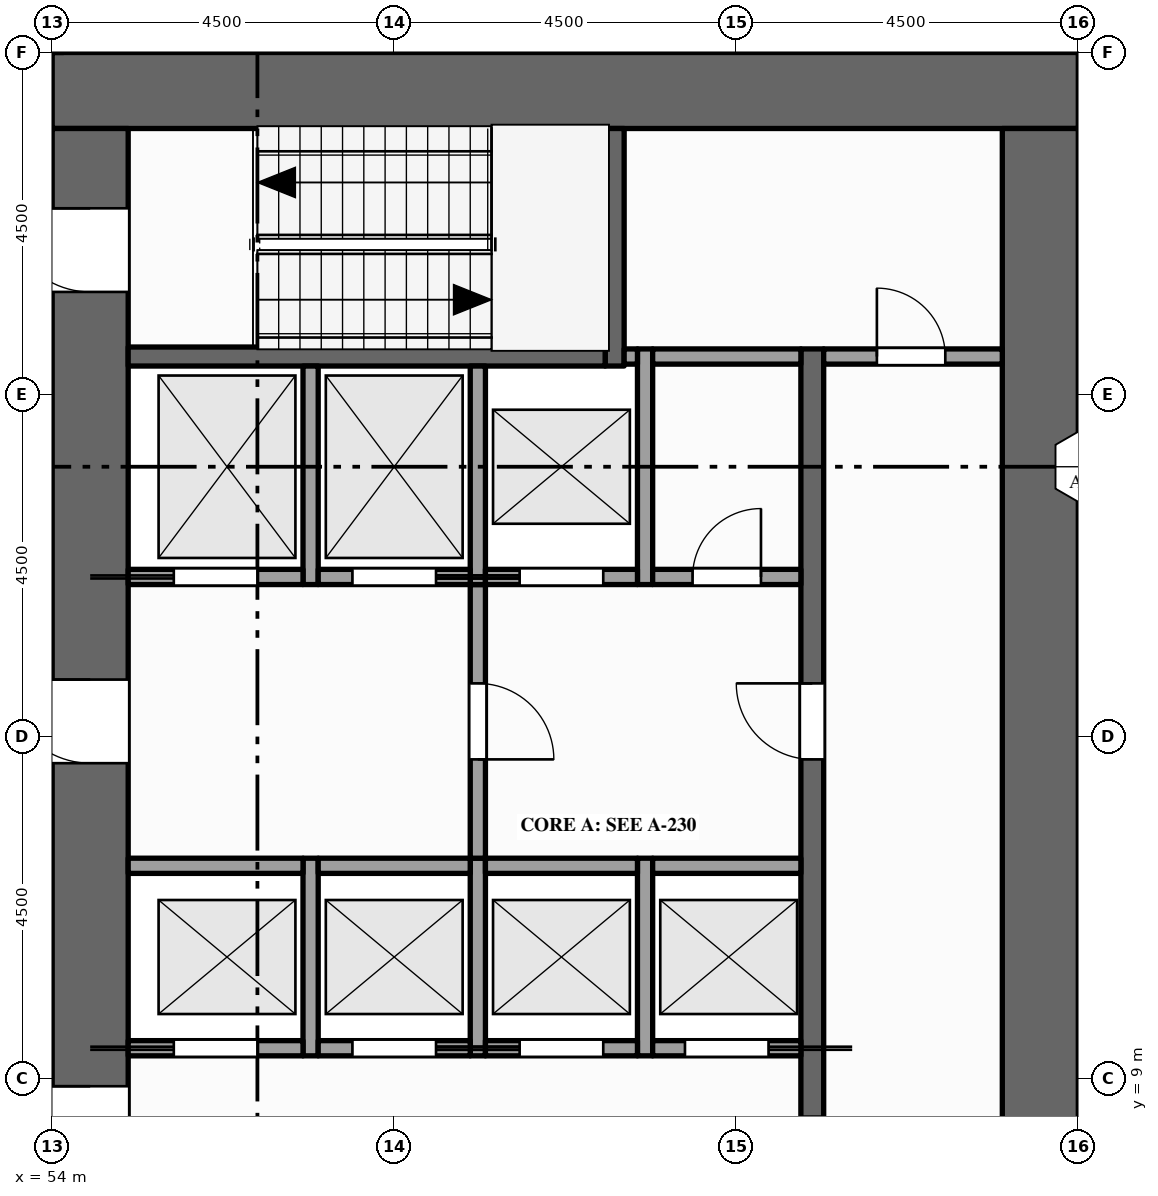
"""IFC4 building model, lengths in metres.
Left out: names, types, materials, properties, quantities, classifications, styles, units other than length and angle.
Written with IfcOpenShell. Run it as: python <this file> out.ifc"""

import sys

from ifc_helpers import new_model, si_unit, direction, frame, frame_2d, origin, place, context, subcontext, project, spatial, rectangle, extrude, element, fill, save


model = new_model("IFC4")
c1 = context("Model", 3, precision=1e-05, world=origin(), true_north=direction((0.0, 1.0)))
c2 = subcontext(c1, "Body", "Model", "MODEL_VIEW")
j1 = project(units=[si_unit("LENGTHUNIT", "METRE"), si_unit("PLANEANGLEUNIT", "RADIAN")], contexts=[c1])
p1 = place(None, origin())
s1 = spatial("IfcSite", under=j1, at=p1, CompositionType="ELEMENT")
p2 = place(p1, origin())
s2 = spatial("IfcBuilding", under=s1, at=p2, CompositionType="ELEMENT")
p3 = place(p2, frame((0.0, 0.0, 159.0)))
s3 = spatial("IfcBuildingStorey", under=s2, at=p3, CompositionType="ELEMENT", Elevation=159.0)
p4 = place(p3, frame((54.0, 22.0, -0.15), z_axis=(0.0, 0.0, 1.0), x_axis=(1.0, 0.0, 0.0)))
e1 = element("IfcWall", 1, at=p4, inside=s3, PredefinedType="SHEAR", context=c2, shape_type="SweptSolid", body=[
    extrude(rectangle(XDim=13.5, YDim=1.0, at=frame_2d((6.75, 0.0))), origin(), (0.0, 0.0, 1.0), 4.0),
])
p5 = place(p3, frame((54.5, 1.0, -0.15), z_axis=(0.0, 0.0, 1.0), x_axis=(0.0, 1.0, 0.0)))
e2 = element("IfcWall", 2, at=p5, inside=s3, PredefinedType="SHEAR", context=c2, shape_type="SweptSolid", body=[
    extrude(rectangle(XDim=20.5, YDim=1.0, at=frame_2d((10.25, 0.0))), origin(), (0.0, 0.0, 1.0), 4.0),
])
p6 = place(p5, frame((6.1, 0.0, 0.15)))
e3 = element("IfcOpeningElement", 3, at=p6, cuts=e2, PredefinedType="OPENING", context=c2, shape_type="SweptSolid", body=[
    extrude(rectangle(XDim=1.8, YDim=2.1, at=frame_2d((0.9, 1.05))), frame((0.0, 0.51, 0.0), z_axis=(0.0, -1.0, 0.0), x_axis=(1.0, 0.0, 0.0)), (0.0, 0.0, 1.0), 1.02),
])
p7 = place(p5, frame((12.15, 0.0, 0.15)))
e4 = element("IfcOpeningElement", 4, at=p7, cuts=e2, PredefinedType="OPENING", context=c2, shape_type="SweptSolid", body=[
    extrude(rectangle(XDim=1.1, YDim=2.1, at=frame_2d((0.55, 1.05))), frame((0.0, 0.51, 0.0), z_axis=(0.0, -1.0, 0.0), x_axis=(1.0, 0.0, 0.0)), (0.0, 0.0, 1.0), 1.02),
])
p8 = place(p5, frame((1.15, 0.0, 0.15)))
e5 = element("IfcOpeningElement", 5, at=p8, cuts=e2, PredefinedType="OPENING", context=c2, shape_type="SweptSolid", body=[
    extrude(rectangle(XDim=1.1, YDim=2.1, at=frame_2d((0.55, 1.05))), frame((0.0, 0.51, 0.0), z_axis=(0.0, -1.0, 0.0), x_axis=(1.0, 0.0, 0.0)), (0.0, 0.0, 1.0), 1.02),
])
p9 = place(p5, frame((18.35, 0.0, 0.15)))
e6 = element("IfcOpeningElement", 6, at=p9, cuts=e2, PredefinedType="OPENING", context=c2, shape_type="SweptSolid", body=[
    extrude(rectangle(XDim=1.1, YDim=2.1, at=frame_2d((0.55, 1.05))), frame((0.0, 0.51, 0.0), z_axis=(0.0, -1.0, 0.0), x_axis=(1.0, 0.0, 0.0)), (0.0, 0.0, 1.0), 1.02),
])
p10 = place(p3, frame((67.0, 1.0, -0.15), z_axis=(0.0, 0.0, 1.0), x_axis=(0.0, 1.0, 0.0)))
e7 = element("IfcWall", 7, at=p10, inside=s3, PredefinedType="SHEAR", context=c2, shape_type="SweptSolid", body=[
    extrude(rectangle(XDim=20.5, YDim=1.0, at=frame_2d((10.25, 0.0))), origin(), (0.0, 0.0, 1.0), 4.0),
])
p11 = place(p3, frame((54.0, 22.5, 0.0), z_axis=(0.0, 0.0, 1.0), x_axis=(0.0, 1.0, 0.0)))
e8 = element("IfcWall", 8, at=p11, inside=s3, PredefinedType="STANDARD", context=c2, shape_type="SweptSolid", body=[
    extrude(rectangle(XDim=1.05, YDim=0.3, at=frame_2d((0.525, 0.0))), origin(), (0.0, 0.0, 1.0), 3.149),
])
p12 = place(p3, frame((57.4, 9.3, 0.0), z_axis=(0.0, 0.0, 1.0), x_axis=(0.0, 1.0, 0.0)))
e9 = element("IfcWall", 9, at=p12, inside=s3, PredefinedType="SOLIDWALL", context=c2, shape_type="SweptSolid", body=[
    extrude(rectangle(XDim=2.6, YDim=0.2, at=frame_2d((1.3, 0.0))), origin(), (0.0, 0.0, 1.0), 3.85),
])
p13 = place(p3, frame((57.4, 15.5, 0.0), z_axis=(0.0, 0.0, 1.0), x_axis=(0.0, 1.0, 0.0)))
e10 = element("IfcWall", 10, at=p13, inside=s3, PredefinedType="SOLIDWALL", context=c2, shape_type="SweptSolid", body=[
    extrude(rectangle(XDim=2.875, YDim=0.2, at=frame_2d((1.438, 0.0))), origin(), (0.0, 0.0, 1.0), 3.85),
])
p14 = place(p3, frame((59.6, 9.3, 0.0), z_axis=(0.0, 0.0, 1.0), x_axis=(0.0, 1.0, 0.0)))
e11 = element("IfcWall", 11, at=p14, inside=s3, PredefinedType="SOLIDWALL", context=c2, shape_type="SweptSolid", body=[
    extrude(rectangle(XDim=2.6, YDim=0.2, at=frame_2d((1.3, 0.0))), origin(), (0.0, 0.0, 1.0), 3.85),
])
p15 = place(p3, frame((59.6, 11.9, 0.0), z_axis=(0.0, 0.0, 1.0), x_axis=(0.0, 1.0, 0.0)))
e12 = element("IfcWall", 12, at=p15, inside=s3, PredefinedType="PARTITIONING", context=c2, shape_type="SweptSolid", body=[
    extrude(rectangle(XDim=3.6, YDim=0.2, at=frame_2d((1.8, 0.0))), origin(), (0.0, 0.0, 1.0), 3.85),
])
p16 = place(p15, frame((1.3, 0.0, 0.0)))
e13 = element("IfcOpeningElement", 13, at=p16, cuts=e12, PredefinedType="OPENING", context=c2, shape_type="SweptSolid", body=[
    extrude(rectangle(XDim=1.0, YDim=2.1, at=frame_2d((0.5, 1.05))), frame((0.0, 0.11, 0.0), z_axis=(0.0, -1.0, 0.0), x_axis=(1.0, 0.0, 0.0)), (0.0, 0.0, 1.0), 0.22),
])
p17 = place(p3, frame((59.6, 15.5, 0.0), z_axis=(0.0, 0.0, 1.0), x_axis=(0.0, 1.0, 0.0)))
e14 = element("IfcWall", 14, at=p17, inside=s3, PredefinedType="SOLIDWALL", context=c2, shape_type="SweptSolid", body=[
    extrude(rectangle(XDim=2.875, YDim=0.2, at=frame_2d((1.438, 0.0))), origin(), (0.0, 0.0, 1.0), 3.85),
])
p18 = place(p3, frame((61.4, 18.375, 0.0), z_axis=(0.0, 0.0, 1.0), x_axis=(0.0, 1.0, 0.0)))
e15 = element("IfcWall", 15, at=p18, inside=s3, PredefinedType="SHEAR", context=c2, shape_type="SweptSolid", body=[
    extrude(rectangle(XDim=3.125, YDim=0.25, at=frame_2d((1.562, 0.0))), origin(), (0.0, 0.0, 1.0), 3.85),
])
p19 = place(p3, frame((61.8, 9.3, 0.0), z_axis=(0.0, 0.0, 1.0), x_axis=(0.0, 1.0, 0.0)))
e16 = element("IfcWall", 16, at=p19, inside=s3, PredefinedType="SOLIDWALL", context=c2, shape_type="SweptSolid", body=[
    extrude(rectangle(XDim=2.6, YDim=0.2, at=frame_2d((1.3, 0.0))), origin(), (0.0, 0.0, 1.0), 3.85),
])
p20 = place(p3, frame((61.8, 15.5, 0.0), z_axis=(0.0, 0.0, 1.0), x_axis=(0.0, 1.0, 0.0)))
e17 = element("IfcWall", 17, at=p20, inside=s3, PredefinedType="SOLIDWALL", context=c2, shape_type="SweptSolid", body=[
    extrude(rectangle(XDim=3.1, YDim=0.2, at=frame_2d((1.55, 0.0))), origin(), (0.0, 0.0, 1.0), 3.85),
])
p21 = place(p3, frame((64.0, 4.1, 0.0), z_axis=(0.0, 0.0, 1.0), x_axis=(0.0, 1.0, 0.0)))
e18 = element("IfcWall", 18, at=p21, inside=s3, PredefinedType="SHEAR", context=c2, shape_type="SweptSolid", body=[
    extrude(rectangle(XDim=14.5, YDim=0.3, at=frame_2d((7.25, 0.0))), origin(), (0.0, 0.0, 1.0), 3.85),
])
p22 = place(p21, frame((3.4, 0.0, 0.0)))
e19 = element("IfcOpeningElement", 19, at=p22, cuts=e18, PredefinedType="OPENING", context=c2, shape_type="SweptSolid", body=[
    extrude(rectangle(XDim=1.0, YDim=2.1, at=frame_2d((0.5, 1.05))), frame((0.0, 0.16, 0.0), z_axis=(0.0, -1.0, 0.0), x_axis=(1.0, 0.0, 0.0)), (0.0, 0.0, 1.0), 0.32),
])
p23 = place(p21, frame((9.1, 0.0, 0.0)))
e20 = element("IfcOpeningElement", 20, at=p23, cuts=e18, PredefinedType="OPENING", context=c2, shape_type="SweptSolid", body=[
    extrude(rectangle(XDim=1.0, YDim=2.1, at=frame_2d((0.5, 1.05))), frame((0.0, 0.16, 0.0), z_axis=(0.0, -1.0, 0.0), x_axis=(1.0, 0.0, 0.0)), (0.0, 0.0, 1.0), 0.32),
])
p24 = place(p3, frame((55.0, 9.4, 0.0), z_axis=(0.0, 0.0, 1.0), x_axis=(1.0, 0.0, 0.0)))
e21 = element("IfcWall", 21, at=p24, inside=s3, PredefinedType="SOLIDWALL", context=c2, shape_type="SweptSolid", body=[
    extrude(rectangle(XDim=2.3, YDim=0.2, at=frame_2d((1.15, 0.0))), origin(), (0.0, 0.0, 1.0), 3.85),
])
p25 = place(p24, frame((0.6, 0.0, 0.012)))
e22 = element("IfcOpeningElement", 22, at=p25, cuts=e21, PredefinedType="OPENING", context=c2, shape_type="SweptSolid", body=[
    extrude(rectangle(XDim=1.1, YDim=2.1, at=frame_2d((0.55, 1.05))), frame((0.0, 0.11, 0.0), z_axis=(0.0, -1.0, 0.0), x_axis=(1.0, 0.0, 0.0)), (0.0, 0.0, 1.0), 0.22),
])
p26 = place(p3, frame((57.5, 9.4, 0.0), z_axis=(0.0, 0.0, 1.0), x_axis=(1.0, 0.0, 0.0)))
e23 = element("IfcWall", 23, at=p26, inside=s3, PredefinedType="SOLIDWALL", context=c2, shape_type="SweptSolid", body=[
    extrude(rectangle(XDim=2.0, YDim=0.2, at=frame_2d((1.0, 0.0))), origin(), (0.0, 0.0, 1.0), 3.85),
])
p27 = place(p26, frame((0.45, 0.0, 0.012)))
e24 = element("IfcOpeningElement", 24, at=p27, cuts=e23, PredefinedType="OPENING", context=c2, shape_type="SweptSolid", body=[
    extrude(rectangle(XDim=1.1, YDim=2.1, at=frame_2d((0.55, 1.05))), frame((0.0, 0.11, 0.0), z_axis=(0.0, -1.0, 0.0), x_axis=(1.0, 0.0, 0.0)), (0.0, 0.0, 1.0), 0.22),
])
p28 = place(p3, frame((59.7, 9.4, 0.0), z_axis=(0.0, 0.0, 1.0), x_axis=(1.0, 0.0, 0.0)))
e25 = element("IfcWall", 25, at=p28, inside=s3, PredefinedType="SOLIDWALL", context=c2, shape_type="SweptSolid", body=[
    extrude(rectangle(XDim=2.0, YDim=0.2, at=frame_2d((1.0, 0.0))), origin(), (0.0, 0.0, 1.0), 3.85),
])
p29 = place(p28, frame((0.45, 0.0, 0.012)))
e26 = element("IfcOpeningElement", 26, at=p29, cuts=e25, PredefinedType="OPENING", context=c2, shape_type="SweptSolid", body=[
    extrude(rectangle(XDim=1.1, YDim=2.1, at=frame_2d((0.55, 1.05))), frame((0.0, 0.11, 0.0), z_axis=(0.0, -1.0, 0.0), x_axis=(1.0, 0.0, 0.0)), (0.0, 0.0, 1.0), 0.22),
])
p30 = place(p3, frame((61.9, 9.4, 0.0), z_axis=(0.0, 0.0, 1.0), x_axis=(1.0, 0.0, 0.0)))
e27 = element("IfcWall", 27, at=p30, inside=s3, PredefinedType="SOLIDWALL", context=c2, shape_type="SweptSolid", body=[
    extrude(rectangle(XDim=1.95, YDim=0.2, at=frame_2d((0.975, 0.0))), origin(), (0.0, 0.0, 1.0), 3.85),
])
p31 = place(p30, frame((0.425, 0.0, 0.012)))
e28 = element("IfcOpeningElement", 28, at=p31, cuts=e27, PredefinedType="OPENING", context=c2, shape_type="SweptSolid", body=[
    extrude(rectangle(XDim=1.1, YDim=2.1, at=frame_2d((0.55, 1.05))), frame((0.0, 0.11, 0.0), z_axis=(0.0, -1.0, 0.0), x_axis=(1.0, 0.0, 0.0)), (0.0, 0.0, 1.0), 0.22),
])
p32 = place(p3, frame((55.0, 11.8, 0.0), z_axis=(0.0, 0.0, 1.0), x_axis=(1.0, 0.0, 0.0)))
e29 = element("IfcWall", 29, at=p32, inside=s3, PredefinedType="SOLIDWALL", context=c2, shape_type="SweptSolid", body=[
    extrude(rectangle(XDim=2.3, YDim=0.2, at=frame_2d((1.15, 0.0))), origin(), (0.0, 0.0, 1.0), 3.85),
])
for number, where, z_axis, x_axis in (
    (30, (57.5, 11.8, 0.0), (0.0, 0.0, 1.0), (1.0, 0.0, 0.0)),
    (31, (59.7, 11.8, 0.0), (0.0, 0.0, 1.0), (1.0, 0.0, 0.0)),
):
    element("IfcWall", number, at=place(p3, frame(where, z_axis=z_axis, x_axis=x_axis)), inside=s3, PredefinedType="SOLIDWALL", context=c2, shape_type="SweptSolid", body=[
        extrude(rectangle(XDim=2.0, YDim=0.2, at=frame_2d((1.0, 0.0))), origin(), (0.0, 0.0, 1.0), 3.85),
    ])
p33 = place(p3, frame((61.9, 11.8, 0.0), z_axis=(0.0, 0.0, 1.0), x_axis=(1.0, 0.0, 0.0)))
e32 = element("IfcWall", 32, at=p33, inside=s3, PredefinedType="SOLIDWALL", context=c2, shape_type="SweptSolid", body=[
    extrude(rectangle(XDim=1.95, YDim=0.2, at=frame_2d((0.975, 0.0))), origin(), (0.0, 0.0, 1.0), 3.85),
])
p34 = place(p3, frame((55.0, 15.6, 0.0), z_axis=(0.0, 0.0, 1.0), x_axis=(1.0, 0.0, 0.0)))
e33 = element("IfcWall", 33, at=p34, inside=s3, PredefinedType="SOLIDWALL", context=c2, shape_type="SweptSolid", body=[
    extrude(rectangle(XDim=2.3, YDim=0.2, at=frame_2d((1.15, 0.0))), origin(), (0.0, 0.0, 1.0), 3.85),
])
p35 = place(p34, frame((0.6, 0.0, 0.012)))
e34 = element("IfcOpeningElement", 34, at=p35, cuts=e33, PredefinedType="OPENING", context=c2, shape_type="SweptSolid", body=[
    extrude(rectangle(XDim=1.1, YDim=2.1, at=frame_2d((0.55, 1.05))), frame((0.0, 0.11, 0.0), z_axis=(0.0, -1.0, 0.0), x_axis=(1.0, 0.0, 0.0)), (0.0, 0.0, 1.0), 0.22),
])
p36 = place(p3, frame((57.5, 15.6, 0.0), z_axis=(0.0, 0.0, 1.0), x_axis=(1.0, 0.0, 0.0)))
e35 = element("IfcWall", 35, at=p36, inside=s3, PredefinedType="SOLIDWALL", context=c2, shape_type="SweptSolid", body=[
    extrude(rectangle(XDim=2.0, YDim=0.2, at=frame_2d((1.0, 0.0))), origin(), (0.0, 0.0, 1.0), 3.85),
])
p37 = place(p36, frame((0.45, 0.0, 0.012)))
e36 = element("IfcOpeningElement", 36, at=p37, cuts=e35, PredefinedType="OPENING", context=c2, shape_type="SweptSolid", body=[
    extrude(rectangle(XDim=1.1, YDim=2.1, at=frame_2d((0.55, 1.05))), frame((0.0, 0.11, 0.0), z_axis=(0.0, -1.0, 0.0), x_axis=(1.0, 0.0, 0.0)), (0.0, 0.0, 1.0), 0.22),
])
p38 = place(p3, frame((59.7, 15.6, 0.0), z_axis=(0.0, 0.0, 1.0), x_axis=(1.0, 0.0, 0.0)))
e37 = element("IfcWall", 37, at=p38, inside=s3, PredefinedType="SOLIDWALL", context=c2, shape_type="SweptSolid", body=[
    extrude(rectangle(XDim=2.0, YDim=0.2, at=frame_2d((1.0, 0.0))), origin(), (0.0, 0.0, 1.0), 3.85),
])
p39 = place(p38, frame((0.45, 0.0, 0.012)))
e38 = element("IfcOpeningElement", 38, at=p39, cuts=e37, PredefinedType="OPENING", context=c2, shape_type="SweptSolid", body=[
    extrude(rectangle(XDim=1.1, YDim=2.1, at=frame_2d((0.55, 1.05))), frame((0.0, 0.11, 0.0), z_axis=(0.0, -1.0, 0.0), x_axis=(1.0, 0.0, 0.0)), (0.0, 0.0, 1.0), 0.22),
])
p40 = place(p3, frame((61.9, 15.6, 0.0), z_axis=(0.0, 0.0, 1.0), x_axis=(1.0, 0.0, 0.0)))
e39 = element("IfcWall", 39, at=p40, inside=s3, PredefinedType="PARTITIONING", context=c2, shape_type="SweptSolid", body=[
    extrude(rectangle(XDim=1.95, YDim=0.2, at=frame_2d((0.975, 0.0))), origin(), (0.0, 0.0, 1.0), 3.85),
])
p41 = place(p40, frame((0.525, 0.0, 0.0)))
e40 = element("IfcOpeningElement", 40, at=p41, cuts=e39, PredefinedType="OPENING", context=c2, shape_type="SweptSolid", body=[
    extrude(rectangle(XDim=0.9, YDim=2.1, at=frame_2d((0.45, 1.05))), frame((0.0, 0.11, 0.0), z_axis=(0.0, -1.0, 0.0), x_axis=(1.0, 0.0, 0.0)), (0.0, 0.0, 1.0), 0.22),
])
p42 = place(p3, frame((55.0, 18.5, 0.0), z_axis=(0.0, 0.0, 1.0), x_axis=(1.0, 0.0, 0.0)))
e41 = element("IfcWall", 41, at=p42, inside=s3, PredefinedType="SHEAR", context=c2, shape_type="SweptSolid", body=[
    extrude(rectangle(XDim=6.275, YDim=0.25, at=frame_2d((3.137, 0.0))), origin(), (0.0, 0.0, 1.0), 3.85),
])
p43 = place(p3, frame((61.525, 18.5, 0.0), z_axis=(0.0, 0.0, 1.0), x_axis=(1.0, 0.0, 0.0)))
e42 = element("IfcWall", 42, at=p43, inside=s3, PredefinedType="SOLIDWALL", context=c2, shape_type="SweptSolid", body=[
    extrude(rectangle(XDim=0.175, YDim=0.2, at=frame_2d((0.087, 0.0))), origin(), (0.0, 0.0, 1.0), 3.85),
])
p44 = place(p3, frame((61.9, 18.5, 0.0), z_axis=(0.0, 0.0, 1.0), x_axis=(1.0, 0.0, 0.0)))
e43 = element("IfcWall", 43, at=p44, inside=s3, PredefinedType="PARTITIONING", context=c2, shape_type="SweptSolid", body=[
    extrude(rectangle(XDim=1.95, YDim=0.2, at=frame_2d((0.975, 0.0))), origin(), (0.0, 0.0, 1.0), 3.85),
])
p45 = place(p3, frame((64.15, 18.5, 0.0), z_axis=(0.0, 0.0, 1.0), x_axis=(1.0, 0.0, 0.0)))
e44 = element("IfcWall", 44, at=p45, inside=s3, PredefinedType="PARTITIONING", context=c2, shape_type="SweptSolid", body=[
    extrude(rectangle(XDim=2.35, YDim=0.2, at=frame_2d((1.175, 0.0))), origin(), (0.0, 0.0, 1.0), 3.85),
])
p46 = place(p45, frame((0.7, 0.0, 0.0)))
e45 = element("IfcOpeningElement", 45, at=p46, cuts=e44, PredefinedType="OPENING", context=c2, shape_type="SweptSolid", body=[
    extrude(rectangle(XDim=0.9, YDim=2.1, at=frame_2d((0.45, 1.05))), frame((0.0, 0.11, 0.0), z_axis=(0.0, -1.0, 0.0), x_axis=(1.0, 0.0, 0.0)), (0.0, 0.0, 1.0), 0.22),
])
p47 = place(p25, origin())
e46 = element("IfcDoor", 46, at=p47, inside=s3, OperationType="SLIDING_TO_LEFT", PredefinedType="DOOR", context=c2, shape_type="SweptSolid", body=[
    extrude(rectangle(XDim=1.1, YDim=2.1, at=frame_2d((0.55, 1.05))), frame((0.0, 0.025, 0.0), z_axis=(0.0, -1.0, 0.0), x_axis=(1.0, 0.0, 0.0)), (0.0, 0.0, 1.0), 0.05),
])
fill(e22, e46)
p48 = place(p27, origin())
e47 = element("IfcDoor", 47, at=p48, inside=s3, OperationType="SLIDING_TO_RIGHT", PredefinedType="DOOR", context=c2, shape_type="SweptSolid", body=[
    extrude(rectangle(XDim=1.1, YDim=2.1, at=frame_2d((0.55, 1.05))), frame((0.0, 0.025, 0.0), z_axis=(0.0, -1.0, 0.0), x_axis=(1.0, 0.0, 0.0)), (0.0, 0.0, 1.0), 0.05),
])
fill(e24, e47)
p49 = place(p29, origin())
e48 = element("IfcDoor", 48, at=p49, inside=s3, OperationType="SLIDING_TO_LEFT", PredefinedType="DOOR", context=c2, shape_type="SweptSolid", body=[
    extrude(rectangle(XDim=1.1, YDim=2.1, at=frame_2d((0.55, 1.05))), frame((0.0, 0.025, 0.0), z_axis=(0.0, -1.0, 0.0), x_axis=(1.0, 0.0, 0.0)), (0.0, 0.0, 1.0), 0.05),
])
fill(e26, e48)
p50 = place(p31, origin())
e49 = element("IfcDoor", 49, at=p50, inside=s3, OperationType="SLIDING_TO_RIGHT", PredefinedType="DOOR", context=c2, shape_type="SweptSolid", body=[
    extrude(rectangle(XDim=1.1, YDim=2.1, at=frame_2d((0.55, 1.05))), frame((0.0, 0.025, 0.0), z_axis=(0.0, -1.0, 0.0), x_axis=(1.0, 0.0, 0.0)), (0.0, 0.0, 1.0), 0.05),
])
fill(e28, e49)
p51 = place(p35, origin())
e50 = element("IfcDoor", 50, at=p51, inside=s3, OperationType="SLIDING_TO_LEFT", PredefinedType="DOOR", context=c2, shape_type="SweptSolid", body=[
    extrude(rectangle(XDim=1.1, YDim=2.1, at=frame_2d((0.55, 1.05))), frame((0.0, 0.025, 0.0), z_axis=(0.0, -1.0, 0.0), x_axis=(1.0, 0.0, 0.0)), (0.0, 0.0, 1.0), 0.05),
])
fill(e34, e50)
p52 = place(p37, origin())
e51 = element("IfcDoor", 51, at=p52, inside=s3, OperationType="SLIDING_TO_RIGHT", PredefinedType="DOOR", context=c2, shape_type="SweptSolid", body=[
    extrude(rectangle(XDim=1.1, YDim=2.1, at=frame_2d((0.55, 1.05))), frame((0.0, 0.025, 0.0), z_axis=(0.0, -1.0, 0.0), x_axis=(1.0, 0.0, 0.0)), (0.0, 0.0, 1.0), 0.05),
])
fill(e36, e51)
p53 = place(p39, origin())
e52 = element("IfcDoor", 52, at=p53, inside=s3, OperationType="SLIDING_TO_LEFT", PredefinedType="DOOR", context=c2, shape_type="SweptSolid", body=[
    extrude(rectangle(XDim=1.1, YDim=2.1, at=frame_2d((0.55, 1.05))), frame((0.0, 0.025, 0.0), z_axis=(0.0, -1.0, 0.0), x_axis=(1.0, 0.0, 0.0)), (0.0, 0.0, 1.0), 0.05),
])
fill(e38, e52)
p54 = place(p6, origin())
e53 = element("IfcDoor", 53, at=p54, inside=s3, OperationType="DOUBLE_DOOR_SINGLE_SWING", PredefinedType="DOOR", context=c2, shape_type="SweptSolid", body=[
    extrude(rectangle(XDim=1.8, YDim=2.1, at=frame_2d((0.9, 1.05))), frame((0.0, 0.025, 0.0), z_axis=(0.0, -1.0, 0.0), x_axis=(1.0, 0.0, 0.0)), (0.0, 0.0, 1.0), 0.05),
])
fill(e3, e53)
p55 = place(p7, origin())
e54 = element("IfcDoor", 54, at=p55, inside=s3, OperationType="SINGLE_SWING_RIGHT", PredefinedType="DOOR", context=c2, shape_type="SweptSolid", body=[
    extrude(rectangle(XDim=1.1, YDim=2.1, at=frame_2d((0.55, 1.05))), frame((0.0, 0.025, 0.0), z_axis=(0.0, -1.0, 0.0), x_axis=(1.0, 0.0, 0.0)), (0.0, 0.0, 1.0), 0.05),
])
fill(e4, e54)
p56 = place(p16, origin())
e55 = element("IfcDoor", 55, at=p56, inside=s3, OperationType="SINGLE_SWING_LEFT", PredefinedType="DOOR", context=c2, shape_type="SweptSolid", body=[
    extrude(rectangle(XDim=1.0, YDim=2.1, at=frame_2d((0.5, 1.05))), frame((0.0, 0.025, 0.0), z_axis=(0.0, -1.0, 0.0), x_axis=(1.0, 0.0, 0.0)), (0.0, 0.0, 1.0), 0.05),
])
fill(e13, e55)
p57 = place(p23, origin())
e56 = element("IfcDoor", 56, at=p57, inside=s3, OperationType="SINGLE_SWING_RIGHT", PredefinedType="DOOR", context=c2, shape_type="SweptSolid", body=[
    extrude(rectangle(XDim=1.0, YDim=2.1, at=frame_2d((0.5, 1.05))), frame((0.0, 0.025, 0.0), z_axis=(0.0, -1.0, 0.0), x_axis=(1.0, 0.0, 0.0)), (0.0, 0.0, 1.0), 0.05),
])
fill(e20, e56)
p58 = place(p9, origin())
e57 = element("IfcDoor", 57, at=p58, inside=s3, OperationType="SINGLE_SWING_RIGHT", PredefinedType="DOOR", context=c2, shape_type="SweptSolid", body=[
    extrude(rectangle(XDim=1.1, YDim=2.1, at=frame_2d((0.55, 1.05))), frame((0.0, 0.025, 0.0), z_axis=(0.0, -1.0, 0.0), x_axis=(1.0, 0.0, 0.0)), (0.0, 0.0, 1.0), 0.05),
])
fill(e6, e57)
p59 = place(p46, origin())
e58 = element("IfcDoor", 58, at=p59, inside=s3, OperationType="SINGLE_SWING_LEFT", PredefinedType="DOOR", context=c2, shape_type="SweptSolid", body=[
    extrude(rectangle(XDim=0.9, YDim=2.1, at=frame_2d((0.45, 1.05))), frame((0.0, 0.025, 0.0), z_axis=(0.0, -1.0, 0.0), x_axis=(1.0, 0.0, 0.0)), (0.0, 0.0, 1.0), 0.05),
])
fill(e45, e58)
p60 = place(p41, origin())
e59 = element("IfcDoor", 59, at=p60, inside=s3, OperationType="SINGLE_SWING_RIGHT", PredefinedType="DOOR", context=c2, shape_type="SweptSolid", body=[
    extrude(rectangle(XDim=0.9, YDim=2.1, at=frame_2d((0.45, 1.05))), frame((0.0, 0.025, 0.0), z_axis=(0.0, -1.0, 0.0), x_axis=(1.0, 0.0, 0.0)), (0.0, 0.0, 1.0), 0.05),
])
fill(e40, e59)
save(model, sys.argv[1])
